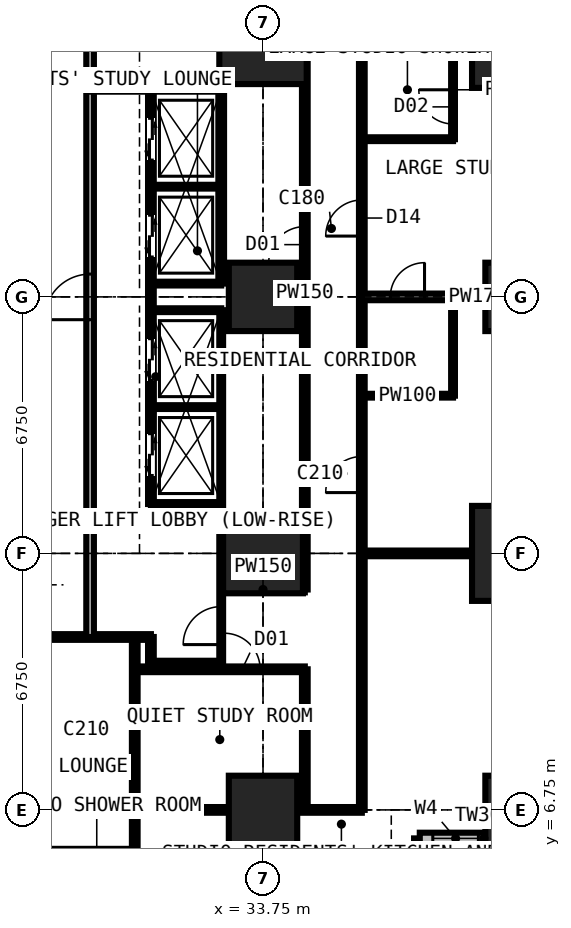
"""IFC4 building model, lengths in metres.
Left out: names, types, materials, properties, quantities, classifications, styles, units other than length and angle.
Written with IfcOpenShell. Run it as: python <this file> out.ifc"""

import sys

from ifc_helpers import new_model, si_unit, direction, frame, frame_2d, origin, origin_2d, place, context, subcontext, project, spatial, rectangle, extrude, element, fill, save


model = new_model("IFC4")
c1 = context("Model", 3, precision=1e-05, world=origin(), true_north=direction((0.0, 1.0)))
c2 = subcontext(c1, "Body", "Model", "MODEL_VIEW")
j1 = project(units=[si_unit("LENGTHUNIT", "METRE"), si_unit("PLANEANGLEUNIT", "RADIAN")], contexts=[c1])
p1 = place(None, origin())
s1 = spatial("IfcSite", under=j1, at=p1, CompositionType="ELEMENT")
p2 = place(p1, origin())
s2 = spatial("IfcBuilding", under=s1, at=p2, CompositionType="ELEMENT")
p3 = place(p2, frame((0.0, 0.0, 80.1)))
s3 = spatial("IfcBuildingStorey", under=s2, at=p3, CompositionType="ELEMENT", Elevation=80.1)
p4 = place(p3, frame((33.75, 6.75, 0.0), z_axis=(0.0, 0.0, 1.0), x_axis=(1.0, 0.0, 0.0)))
e1 = element("IfcColumn", 1, at=p4, inside=s3, PredefinedType="COLUMN", context=c2, shape_type="SweptSolid", body=[
    extrude(rectangle(XDim=1.8, YDim=1.8, at=origin_2d()), origin(), (0.0, 0.0, 1.0), 3.6),
])
p5 = place(p3, frame((33.75, 13.5, 0.0), z_axis=(0.0, 0.0, 1.0), x_axis=(1.0, 0.0, 0.0)))
e2 = element("IfcColumn", 2, at=p5, inside=s3, PredefinedType="COLUMN", context=c2, shape_type="SweptSolid", body=[
    extrude(rectangle(XDim=2.1, YDim=2.1, at=origin_2d()), origin(), (0.0, 0.0, 1.0), 3.6),
])
p6 = place(p3, frame((33.75, 20.25, 0.0), z_axis=(0.0, 0.0, 1.0), x_axis=(1.0, 0.0, 0.0)))
e3 = element("IfcColumn", 3, at=p6, inside=s3, PredefinedType="COLUMN", context=c2, shape_type="SweptSolid", body=[
    extrude(rectangle(XDim=1.8, YDim=1.8, at=origin_2d()), origin(), (0.0, 0.0, 1.0), 3.6),
])
p7 = place(p3, frame((33.75, 27.0, 0.0), z_axis=(0.0, 0.0, 1.0), x_axis=(1.0, 0.0, 0.0)))
e4 = element("IfcColumn", 4, at=p7, inside=s3, PredefinedType="COLUMN", context=c2, shape_type="SweptSolid", body=[
    extrude(rectangle(XDim=2.3, YDim=2.3, at=origin_2d()), origin(), (0.0, 0.0, 1.0), 3.6),
])
p8 = place(p3, frame((40.5, 6.75, 0.0), z_axis=(0.0, 0.0, 1.0), x_axis=(1.0, 0.0, 0.0)))
e5 = element("IfcColumn", 5, at=p8, inside=s3, PredefinedType="COLUMN", context=c2, shape_type="SweptSolid", body=[
    extrude(rectangle(XDim=1.8, YDim=1.8, at=origin_2d()), origin(), (0.0, 0.0, 1.0), 3.6),
])
p9 = place(p3, frame((40.5, 13.5, 0.0), z_axis=(0.0, 0.0, 1.0), x_axis=(1.0, 0.0, 0.0)))
e6 = element("IfcColumn", 6, at=p9, inside=s3, PredefinedType="COLUMN", context=c2, shape_type="SweptSolid", body=[
    extrude(rectangle(XDim=2.5, YDim=2.5, at=origin_2d()), origin(), (0.0, 0.0, 1.0), 3.6),
])
p10 = place(p3, frame((40.5, 20.25, 0.0), z_axis=(0.0, 0.0, 1.0), x_axis=(1.0, 0.0, 0.0)))
e7 = element("IfcColumn", 7, at=p10, inside=s3, PredefinedType="COLUMN", context=c2, shape_type="SweptSolid", body=[
    extrude(rectangle(XDim=1.8, YDim=1.8, at=origin_2d()), origin(), (0.0, 0.0, 1.0), 3.6),
])
p11 = place(p3, frame((40.5, 27.0, 0.0), z_axis=(0.0, 0.0, 1.0), x_axis=(1.0, 0.0, 0.0)))
e8 = element("IfcColumn", 8, at=p11, inside=s3, PredefinedType="COLUMN", context=c2, shape_type="SweptSolid", body=[
    extrude(rectangle(XDim=2.5, YDim=2.5, at=origin_2d()), origin(), (0.0, 0.0, 1.0), 3.6),
])
p12 = place(p3, frame((37.875, 2.625, 0.0), z_axis=(0.0, 0.0, 1.0), x_axis=(0.0, 1.0, 0.0)))
e9 = element("IfcWall", 9, at=p12, inside=s3, PredefinedType="SOLIDWALL", context=c2, shape_type="SweptSolid", body=[
    extrude(rectangle(XDim=3.375, YDim=0.3, at=frame_2d((1.688, 0.0))), origin(), (0.0, 0.0, 1.0), 3.375),
])
p13 = place(p12, frame((0.788, 0.0, 0.6)))
e10 = element("IfcOpeningElement", 10, at=p13, cuts=e9, PredefinedType="OPENING", context=c2, shape_type="SweptSolid", body=[
    extrude(rectangle(XDim=1.8, YDim=2.1, at=frame_2d((0.9, 1.05))), frame((0.0, 0.16, 0.0), z_axis=(0.0, -1.0, 0.0), x_axis=(1.0, 0.0, 0.0)), (0.0, 0.0, 1.0), 0.32),
])
p14 = place(p3, frame((37.875, 6.0, 0.0), z_axis=(0.0, 0.0, 1.0), x_axis=(1.0, 0.0, 0.0)))
e11 = element("IfcWall", 11, at=p14, inside=s3, PredefinedType="SOLIDWALL", context=c2, shape_type="SweptSolid", body=[
    extrude(rectangle(XDim=3.375, YDim=0.3, at=frame_2d((1.688, 0.0))), origin(), (0.0, 0.0, 1.0), 3.375),
])
p15 = place(p14, frame((0.343, 0.0, 0.9)))
e12 = element("IfcOpeningElement", 12, at=p15, cuts=e11, PredefinedType="OPENING", context=c2, shape_type="SweptSolid", body=[
    extrude(rectangle(XDim=1.2, YDim=1.8, at=frame_2d((0.6, 0.9))), frame((0.0, 0.16, 0.0), z_axis=(0.0, -1.0, 0.0), x_axis=(1.0, 0.0, 0.0)), (0.0, 0.0, 1.0), 0.32),
])
p16 = place(p3, frame((10.125, 11.3, 0.0), z_axis=(0.0, 0.0, 1.0), x_axis=(1.0, 0.0, 0.0)))
e13 = element("IfcWall", 13, at=p16, inside=s3, PredefinedType="PARTITIONING", context=c2, shape_type="SweptSolid", body=[
    extrude(rectangle(XDim=20.675, YDim=0.15, at=frame_2d((10.337, 0.0))), origin(), (0.0, 0.0, 1.0), 3.375),
])
p17 = place(p16, frame((11.312, 0.0, 0.0)))
e14 = element("IfcOpeningElement", 14, at=p17, cuts=e13, PredefinedType="OPENING", context=c2, shape_type="SweptSolid", body=[
    extrude(rectangle(XDim=1.0, YDim=2.2, at=frame_2d((0.5, 1.1))), frame((0.0, 0.085, 0.0), z_axis=(0.0, -1.0, 0.0), x_axis=(1.0, 0.0, 0.0)), (0.0, 0.0, 1.0), 0.17),
])
p18 = place(p3, frame((29.2, 11.3, 0.0), z_axis=(0.0, 0.0, 1.0), x_axis=(0.0, 1.0, 0.0)))
e15 = element("IfcWall", 15, at=p18, inside=s3, PredefinedType="PARTITIONING", context=c2, shape_type="SweptSolid", body=[
    extrude(rectangle(XDim=17.9, YDim=0.2, at=frame_2d((8.95, 0.0))), origin(), (0.0, 0.0, 1.0), 3.375),
])
p19 = place(p18, frame((8.35, 0.0, 0.0)))
e16 = element("IfcOpeningElement", 16, at=p19, cuts=e15, PredefinedType="OPENING", context=c2, shape_type="SweptSolid", body=[
    extrude(rectangle(XDim=1.2, YDim=2.2, at=frame_2d((0.6, 1.1))), frame((0.0, 0.11, 0.0), z_axis=(0.0, -1.0, 0.0), x_axis=(1.0, 0.0, 0.0)), (0.0, 0.0, 1.0), 0.22),
])
p20 = place(p3, frame((29.2, 25.7, 0.0), z_axis=(0.0, 0.0, 1.0), x_axis=(1.0, 0.0, 0.0)))
e17 = element("IfcWall", 17, at=p20, inside=s3, PredefinedType="SHEAR", context=c2, shape_type="SweptSolid", body=[
    extrude(rectangle(XDim=3.45, YDim=0.1, at=frame_2d((1.725, 0.0))), origin(), (0.0, 0.0, 1.0), 3.375),
])
p21 = place(p3, frame((30.375, -0.734, 0.0), z_axis=(0.0, 0.0, 1.0), x_axis=(0.0, 1.0, 0.0)))
e18 = element("IfcWall", 18, at=p21, inside=s3, PredefinedType="PARTITIONING", context=c2, shape_type="SweptSolid", body=[
    extrude(rectangle(XDim=12.034, YDim=0.15, at=frame_2d((6.017, 0.0))), origin(), (0.0, 0.0, 1.0), 3.375),
])
p22 = place(p21, frame((5.134, 0.0, 0.0)))
e19 = element("IfcOpeningElement", 19, at=p22, cuts=e18, PredefinedType="OPENING", context=c2, shape_type="SweptSolid", body=[
    extrude(rectangle(XDim=1.0, YDim=2.2, at=frame_2d((0.5, 1.1))), frame((0.0, 0.085, 0.0), z_axis=(0.0, -1.0, 0.0), x_axis=(1.0, 0.0, 0.0)), (0.0, 0.0, 1.0), 0.17),
])
p23 = place(p3, frame((30.375, 6.75, 0.0), z_axis=(0.0, 0.0, 1.0), x_axis=(1.0, 0.0, 0.0)))
e20 = element("IfcWall", 20, at=p23, inside=s3, PredefinedType="PARTITIONING", context=c2, shape_type="SweptSolid", body=[
    extrude(rectangle(XDim=5.975, YDim=0.15, at=frame_2d((2.988, 0.0))), origin(), (0.0, 0.0, 1.0), 2.877),
])
p24 = place(p3, frame((30.375, 10.45, 0.0), z_axis=(0.0, 0.0, 1.0), x_axis=(1.0, 0.0, 0.0)))
e21 = element("IfcWall", 21, at=p24, inside=s3, PredefinedType="PARTITIONING", context=c2, shape_type="SweptSolid", body=[
    extrude(rectangle(XDim=4.475, YDim=0.15, at=frame_2d((2.238, 0.0))), origin(), (0.0, 0.0, 1.0), 3.375),
])
p25 = place(p24, frame((2.35, 0.0, 0.0)))
e22 = element("IfcOpeningElement", 22, at=p25, cuts=e21, PredefinedType="OPENING", context=c2, shape_type="SweptSolid", body=[
    extrude(rectangle(XDim=0.95, YDim=2.2, at=frame_2d((0.475, 1.1))), frame((0.0, 0.085, 0.0), z_axis=(0.0, -1.0, 0.0), x_axis=(1.0, 0.0, 0.0)), (0.0, 0.0, 1.0), 0.17),
])
p26 = place(p3, frame((30.8, 10.6, 0.0), z_axis=(0.0, 0.0, 1.0), x_axis=(0.0, 1.0, 0.0)))
e23 = element("IfcWall", 23, at=p26, inside=s3, PredefinedType="PARTITIONING", context=c2, shape_type="SweptSolid", body=[
    extrude(rectangle(XDim=0.7, YDim=0.15, at=frame_2d((0.35, 0.0))), origin(), (0.0, 0.0, 1.0), 3.375),
])
p27 = place(p3, frame((30.8, 10.6, 0.0), z_axis=(0.0, 0.0, 1.0), x_axis=(1.0, 0.0, 0.0)))
e24 = element("IfcWall", 24, at=p27, inside=s3, PredefinedType="PARTITIONING", context=c2, shape_type="SweptSolid", body=[
    extrude(rectangle(XDim=1.85, YDim=0.15, at=frame_2d((0.925, 0.0))), origin(), (0.0, 0.0, 1.0), 3.375),
])
p28 = place(p3, frame((30.8, 14.8, 0.0), z_axis=(0.0, 0.0, 1.0), x_axis=(0.0, 1.0, 0.0)))
e25 = element("IfcWall", 25, at=p28, inside=s3, PredefinedType="PARTITIONING", context=c2, shape_type="SweptSolid", body=[
    extrude(rectangle(XDim=10.9, YDim=0.15, at=frame_2d((5.45, 0.0))), origin(), (0.0, 0.0, 1.0), 3.375),
])
p29 = place(p28, frame((0.75, 0.0, 0.0)))
e26 = element("IfcOpeningElement", 26, at=p29, cuts=e25, PredefinedType="OPENING", context=c2, shape_type="SweptSolid", body=[
    extrude(rectangle(XDim=1.1, YDim=2.2, at=frame_2d((0.55, 1.1))), frame((0.0, 0.085, 0.0), z_axis=(0.0, -1.0, 0.0), x_axis=(1.0, 0.0, 0.0)), (0.0, 0.0, 1.0), 0.17),
])
p30 = place(p28, frame((3.25, 0.0, 0.0)))
e27 = element("IfcOpeningElement", 27, at=p30, cuts=e25, PredefinedType="OPENING", context=c2, shape_type="SweptSolid", body=[
    extrude(rectangle(XDim=1.1, YDim=2.2, at=frame_2d((0.55, 1.1))), frame((0.0, 0.085, 0.0), z_axis=(0.0, -1.0, 0.0), x_axis=(1.0, 0.0, 0.0)), (0.0, 0.0, 1.0), 0.17),
])
p31 = place(p28, frame((6.5, 0.0, 0.0)))
e28 = element("IfcOpeningElement", 28, at=p31, cuts=e25, PredefinedType="OPENING", context=c2, shape_type="SweptSolid", body=[
    extrude(rectangle(XDim=1.1, YDim=2.2, at=frame_2d((0.55, 1.1))), frame((0.0, 0.085, 0.0), z_axis=(0.0, -1.0, 0.0), x_axis=(1.0, 0.0, 0.0)), (0.0, 0.0, 1.0), 0.17),
])
p32 = place(p28, frame((9.05, 0.0, 0.0)))
e29 = element("IfcOpeningElement", 29, at=p32, cuts=e25, PredefinedType="OPENING", context=c2, shape_type="SweptSolid", body=[
    extrude(rectangle(XDim=1.1, YDim=2.2, at=frame_2d((0.55, 1.1))), frame((0.0, 0.085, 0.0), z_axis=(0.0, -1.0, 0.0), x_axis=(1.0, 0.0, 0.0)), (0.0, 0.0, 1.0), 0.17),
])
for number, where, z_axis, x_axis in (
    (30, (30.8, 14.8, 0.0), (0.0, 0.0, 1.0), (1.0, 0.0, 0.0)),
    (31, (30.8, 17.35, 0.0), (0.0, 0.0, 1.0), (1.0, 0.0, 0.0)),
    (32, (30.8, 19.9, 0.0), (0.0, 0.0, 1.0), (1.0, 0.0, 0.0)),
    (33, (30.8, 20.6, 0.0), (0.0, 0.0, 1.0), (1.0, 0.0, 0.0)),
    (34, (30.8, 23.15, 0.0), (0.0, 0.0, 1.0), (1.0, 0.0, 0.0)),
):
    element("IfcWall", number, at=place(p3, frame(where, z_axis=z_axis, x_axis=x_axis)), inside=s3, PredefinedType="SHEAR", context=c2, shape_type="SweptSolid", body=[
        extrude(rectangle(XDim=1.85, YDim=0.1, at=frame_2d((0.925, 0.0))), origin(), (0.0, 0.0, 1.0), 3.375),
    ])
p33 = place(p3, frame((32.65, 10.6, 0.0), z_axis=(0.0, 0.0, 1.0), x_axis=(0.0, 1.0, 0.0)))
e35 = element("IfcWall", 35, at=p33, inside=s3, PredefinedType="SHEAR", context=c2, shape_type="SweptSolid", body=[
    extrude(rectangle(XDim=9.3, YDim=0.1, at=frame_2d((4.65, 0.0))), origin(), (0.0, 0.0, 1.0), 3.375),
])
p34 = place(p33, frame((0.5, 0.0, 0.0)))
e36 = element("IfcOpeningElement", 36, at=p34, cuts=e35, PredefinedType="OPENING", context=c2, shape_type="SweptSolid", body=[
    extrude(rectangle(XDim=1.0, YDim=2.2, at=frame_2d((0.5, 1.1))), frame((0.0, 0.06, 0.0), z_axis=(0.0, -1.0, 0.0), x_axis=(1.0, 0.0, 0.0)), (0.0, 0.0, 1.0), 0.12),
])
p35 = place(p3, frame((32.65, 12.55, 0.0), z_axis=(0.0, 0.0, 1.0), x_axis=(1.0, 0.0, 0.0)))
e37 = element("IfcWall", 37, at=p35, inside=s3, PredefinedType="PARTITIONING", context=c2, shape_type="SweptSolid", body=[
    extrude(rectangle(XDim=2.2, YDim=0.15, at=frame_2d((1.1, 0.0))), origin(), (0.0, 0.0, 1.0), 3.375),
])
p36 = place(p3, frame((32.65, 20.6, 0.0), z_axis=(0.0, 0.0, 1.0), x_axis=(0.0, 1.0, 0.0)))
e38 = element("IfcWall", 38, at=p36, inside=s3, PredefinedType="PARTITIONING", context=c2, shape_type="SweptSolid", body=[
    extrude(rectangle(XDim=5.1, YDim=0.15, at=frame_2d((2.55, 0.0))), origin(), (0.0, 0.0, 1.0), 3.375),
])
p37 = place(p3, frame((34.85, 6.75, 0.0), z_axis=(0.0, 0.0, 1.0), x_axis=(0.0, 1.0, 0.0)))
e39 = element("IfcWall", 39, at=p37, inside=s3, PredefinedType="PARTITIONING", context=c2, shape_type="SweptSolid", body=[
    extrude(rectangle(XDim=3.7, YDim=0.15, at=frame_2d((1.85, 0.0))), origin(), (0.0, 0.0, 1.0), 3.375),
])
p38 = place(p3, frame((34.85, 12.55, 0.0), z_axis=(0.0, 0.0, 1.0), x_axis=(0.0, 1.0, 0.0)))
e40 = element("IfcWall", 40, at=p38, inside=s3, PredefinedType="PARTITIONING", context=c2, shape_type="SweptSolid", body=[
    extrude(rectangle(XDim=17.825, YDim=0.15, at=frame_2d((8.913, 0.0))), origin(), (0.0, 0.0, 1.0), 3.375),
])
p39 = place(p38, frame((8.6, 0.0, 0.0)))
e41 = element("IfcOpeningElement", 41, at=p39, cuts=e40, PredefinedType="OPENING", context=c2, shape_type="SweptSolid", body=[
    extrude(rectangle(XDim=0.95, YDim=2.2, at=frame_2d((0.475, 1.1))), frame((0.0, 0.085, 0.0), z_axis=(0.0, -1.0, 0.0), x_axis=(1.0, 0.0, 0.0)), (0.0, 0.0, 1.0), 0.17),
])
p40 = place(p3, frame((36.35, 6.75, 0.0), z_axis=(0.0, 0.0, 1.0), x_axis=(0.0, 1.0, 0.0)))
e42 = element("IfcWall", 42, at=p40, inside=s3, PredefinedType="PARTITIONING", context=c2, shape_type="SweptSolid", body=[
    extrude(rectangle(XDim=20.25, YDim=0.15, at=frame_2d((10.125, 0.0))), origin(), (0.0, 0.0, 1.0), 3.375),
])
p41 = place(p40, frame((15.1, 0.0, 0.0)))
e43 = element("IfcOpeningElement", 43, at=p41, cuts=e42, PredefinedType="OPENING", context=c2, shape_type="SweptSolid", body=[
    extrude(rectangle(XDim=0.95, YDim=2.2, at=frame_2d((0.475, 1.1))), frame((0.0, 0.085, 0.0), z_axis=(0.0, -1.0, 0.0), x_axis=(1.0, 0.0, 0.0)), (0.0, 0.0, 1.0), 0.17),
])
p42 = place(p40, frame((8.35, 0.0, 0.0)))
e44 = element("IfcOpeningElement", 44, at=p42, cuts=e42, PredefinedType="OPENING", context=c2, shape_type="SweptSolid", body=[
    extrude(rectangle(XDim=0.95, YDim=2.2, at=frame_2d((0.475, 1.1))), frame((0.0, 0.085, 0.0), z_axis=(0.0, -1.0, 0.0), x_axis=(1.0, 0.0, 0.0)), (0.0, 0.0, 1.0), 0.17),
])
p43 = place(p3, frame((36.35, 13.5, 0.0), z_axis=(0.0, 0.0, 1.0), x_axis=(1.0, 0.0, 0.0)))
e45 = element("IfcWall", 45, at=p43, inside=s3, PredefinedType="PARTITIONING", context=c2, shape_type="SweptSolid", body=[
    extrude(rectangle(XDim=4.884, YDim=0.15, at=frame_2d((2.442, 0.0))), origin(), (0.0, 0.0, 1.0), 2.877),
])
p44 = place(p3, frame((36.35, 17.65, 0.0), z_axis=(0.0, 0.0, 1.0), x_axis=(1.0, 0.0, 0.0)))
e46 = element("IfcWall", 46, at=p44, inside=s3, PredefinedType="PARTITIONING", context=c2, shape_type="SweptSolid", body=[
    extrude(rectangle(XDim=2.4, YDim=0.1, at=frame_2d((1.2, 0.0))), origin(), (0.0, 0.0, 1.0), 3.375),
])
p45 = place(p3, frame((36.35, 20.25, 0.0), z_axis=(0.0, 0.0, 1.0), x_axis=(1.0, 0.0, 0.0)))
e47 = element("IfcWall", 47, at=p45, inside=s3, PredefinedType="PARTITIONING", context=c2, shape_type="SweptSolid", body=[
    extrude(rectangle(XDim=4.884, YDim=0.175, at=frame_2d((2.442, 0.0))), origin(), (0.0, 0.0, 1.0), 2.877),
])
p46 = place(p45, frame((0.75, 0.0, 0.0)))
e48 = element("IfcOpeningElement", 48, at=p46, cuts=e47, PredefinedType="OPENING", context=c2, shape_type="SweptSolid", body=[
    extrude(rectangle(XDim=0.9, YDim=2.2, at=frame_2d((0.45, 1.1))), frame((0.0, 0.097, 0.0), z_axis=(0.0, -1.0, 0.0), x_axis=(1.0, 0.0, 0.0)), (0.0, 0.0, 1.0), 0.195),
])
p47 = place(p3, frame((36.35, 24.4, 0.0), z_axis=(0.0, 0.0, 1.0), x_axis=(1.0, 0.0, 0.0)))
e49 = element("IfcWall", 49, at=p47, inside=s3, PredefinedType="PARTITIONING", context=c2, shape_type="SweptSolid", body=[
    extrude(rectangle(XDim=2.4, YDim=0.1, at=frame_2d((1.2, 0.0))), origin(), (0.0, 0.0, 1.0), 3.375),
])
p48 = place(p3, frame((38.75, 17.65, 0.0), z_axis=(0.0, 0.0, 1.0), x_axis=(0.0, 1.0, 0.0)))
e50 = element("IfcWall", 50, at=p48, inside=s3, PredefinedType="PARTITIONING", context=c2, shape_type="SweptSolid", body=[
    extrude(rectangle(XDim=2.6, YDim=0.1, at=frame_2d((1.3, 0.0))), origin(), (0.0, 0.0, 1.0), 3.375),
])
p49 = place(p3, frame((38.75, 24.4, 0.0), z_axis=(0.0, 0.0, 1.0), x_axis=(0.0, 1.0, 0.0)))
e51 = element("IfcWall", 51, at=p49, inside=s3, PredefinedType="PARTITIONING", context=c2, shape_type="SweptSolid", body=[
    extrude(rectangle(XDim=2.6, YDim=0.1, at=frame_2d((1.3, 0.0))), origin(), (0.0, 0.0, 1.0), 3.375),
])
p50 = place(p49, frame((0.4, 0.0, 0.0)))
e52 = element("IfcOpeningElement", 52, at=p50, cuts=e51, PredefinedType="OPENING", context=c2, shape_type="SweptSolid", body=[
    extrude(rectangle(XDim=0.9, YDim=2.2, at=frame_2d((0.45, 1.1))), frame((0.0, 0.06, 0.0), z_axis=(0.0, -1.0, 0.0), x_axis=(1.0, 0.0, 0.0)), (0.0, 0.0, 1.0), 0.12),
])
p51 = place(p15, origin())
e53 = element("IfcWindow", 53, at=p51, inside=s3, PartitioningType="SINGLE_PANEL", PredefinedType="WINDOW", context=c2, shape_type="SweptSolid", body=[
    extrude(rectangle(XDim=1.2, YDim=1.8, at=frame_2d((0.6, 0.9))), frame((0.0, 0.03, 0.0), z_axis=(0.0, -1.0, 0.0), x_axis=(1.0, 0.0, 0.0)), (0.0, 0.0, 1.0), 0.06),
])
fill(e12, e53)
p52 = place(p41, origin())
e54 = element("IfcDoor", 54, at=p52, inside=s3, OperationType="SINGLE_SWING_LEFT", PredefinedType="DOOR", context=c2, shape_type="SweptSolid", body=[
    extrude(rectangle(XDim=0.95, YDim=2.2, at=frame_2d((0.475, 1.1))), frame((0.0, 0.025, 0.0), z_axis=(0.0, -1.0, 0.0), x_axis=(1.0, 0.0, 0.0)), (0.0, 0.0, 1.0), 0.05),
])
fill(e43, e54)
p53 = place(p50, origin())
e55 = element("IfcDoor", 55, at=p53, inside=s3, OperationType="SINGLE_SWING_RIGHT", PredefinedType="DOOR", context=c2, shape_type="SweptSolid", body=[
    extrude(rectangle(XDim=0.9, YDim=2.2, at=frame_2d((0.45, 1.1))), frame((0.0, 0.025, 0.0), z_axis=(0.0, -1.0, 0.0), x_axis=(1.0, 0.0, 0.0)), (0.0, 0.0, 1.0), 0.05),
])
fill(e52, e55)
p54 = place(p42, origin())
e56 = element("IfcDoor", 56, at=p54, inside=s3, OperationType="SINGLE_SWING_LEFT", PredefinedType="DOOR", context=c2, shape_type="SweptSolid", body=[
    extrude(rectangle(XDim=0.95, YDim=2.2, at=frame_2d((0.475, 1.1))), frame((0.0, 0.025, 0.0), z_axis=(0.0, -1.0, 0.0), x_axis=(1.0, 0.0, 0.0)), (0.0, 0.0, 1.0), 0.05),
])
fill(e44, e56)
p55 = place(p46, origin())
e57 = element("IfcDoor", 57, at=p55, inside=s3, OperationType="SINGLE_SWING_RIGHT", PredefinedType="DOOR", context=c2, shape_type="SweptSolid", body=[
    extrude(rectangle(XDim=0.9, YDim=2.2, at=frame_2d((0.45, 1.1))), frame((0.0, 0.025, 0.0), z_axis=(0.0, -1.0, 0.0), x_axis=(1.0, 0.0, 0.0)), (0.0, 0.0, 1.0), 0.05),
])
fill(e48, e57)
p56 = place(p34, origin())
e58 = element("IfcDoor", 58, at=p56, inside=s3, OperationType="SINGLE_SWING_LEFT", PredefinedType="DOOR", context=c2, shape_type="SweptSolid", body=[
    extrude(rectangle(XDim=1.0, YDim=2.2, at=frame_2d((0.5, 1.1))), frame((0.0, 0.025, 0.0), z_axis=(0.0, -1.0, 0.0), x_axis=(1.0, 0.0, 0.0)), (0.0, 0.0, 1.0), 0.05),
])
fill(e36, e58)
p57 = place(p39, origin())
e59 = element("IfcDoor", 59, at=p57, inside=s3, OperationType="SINGLE_SWING_LEFT", PredefinedType="DOOR", context=c2, shape_type="SweptSolid", body=[
    extrude(rectangle(XDim=0.95, YDim=2.2, at=frame_2d((0.475, 1.1))), frame((0.0, 0.025, 0.0), z_axis=(0.0, -1.0, 0.0), x_axis=(1.0, 0.0, 0.0)), (0.0, 0.0, 1.0), 0.05),
])
fill(e41, e59)
p58 = place(p25, origin())
e60 = element("IfcDoor", 60, at=p58, inside=s3, OperationType="SINGLE_SWING_LEFT", PredefinedType="DOOR", context=c2, shape_type="SweptSolid", body=[
    extrude(rectangle(XDim=0.95, YDim=2.2, at=frame_2d((0.475, 1.1))), frame((0.0, 0.025, 0.0), z_axis=(0.0, -1.0, 0.0), x_axis=(1.0, 0.0, 0.0)), (0.0, 0.0, 1.0), 0.05),
])
fill(e22, e60)
p59 = place(p29, origin())
e61 = element("IfcDoor", 61, at=p59, inside=s3, OperationType="DOUBLE_DOOR_SLIDING", PredefinedType="DOOR", context=c2, shape_type="SweptSolid", body=[
    extrude(rectangle(XDim=1.1, YDim=2.2, at=frame_2d((0.55, 1.1))), frame((0.0, 0.025, 0.0), z_axis=(0.0, -1.0, 0.0), x_axis=(1.0, 0.0, 0.0)), (0.0, 0.0, 1.0), 0.05),
])
fill(e26, e61)
p60 = place(p30, origin())
e62 = element("IfcDoor", 62, at=p60, inside=s3, OperationType="DOUBLE_DOOR_SLIDING", PredefinedType="DOOR", context=c2, shape_type="SweptSolid", body=[
    extrude(rectangle(XDim=1.1, YDim=2.2, at=frame_2d((0.55, 1.1))), frame((0.0, 0.025, 0.0), z_axis=(0.0, -1.0, 0.0), x_axis=(1.0, 0.0, 0.0)), (0.0, 0.0, 1.0), 0.05),
])
fill(e27, e62)
p61 = place(p31, origin())
e63 = element("IfcDoor", 63, at=p61, inside=s3, OperationType="DOUBLE_DOOR_SLIDING", PredefinedType="DOOR", context=c2, shape_type="SweptSolid", body=[
    extrude(rectangle(XDim=1.1, YDim=2.2, at=frame_2d((0.55, 1.1))), frame((0.0, 0.025, 0.0), z_axis=(0.0, -1.0, 0.0), x_axis=(1.0, 0.0, 0.0)), (0.0, 0.0, 1.0), 0.05),
])
fill(e28, e63)
p62 = place(p32, origin())
e64 = element("IfcDoor", 64, at=p62, inside=s3, OperationType="DOUBLE_DOOR_SLIDING", PredefinedType="DOOR", context=c2, shape_type="SweptSolid", body=[
    extrude(rectangle(XDim=1.1, YDim=2.2, at=frame_2d((0.55, 1.1))), frame((0.0, 0.025, 0.0), z_axis=(0.0, -1.0, 0.0), x_axis=(1.0, 0.0, 0.0)), (0.0, 0.0, 1.0), 0.05),
])
fill(e29, e64)
p63 = place(p19, origin())
e65 = element("IfcDoor", 65, at=p63, inside=s3, OperationType="DOUBLE_DOOR_SINGLE_SWING", PredefinedType="DOOR", context=c2, shape_type="SweptSolid", body=[
    extrude(rectangle(XDim=1.2, YDim=2.2, at=frame_2d((0.6, 1.1))), frame((0.0, 0.025, 0.0), z_axis=(0.0, -1.0, 0.0), x_axis=(1.0, 0.0, 0.0)), (0.0, 0.0, 1.0), 0.05),
])
fill(e16, e65)
save(model, sys.argv[1])
